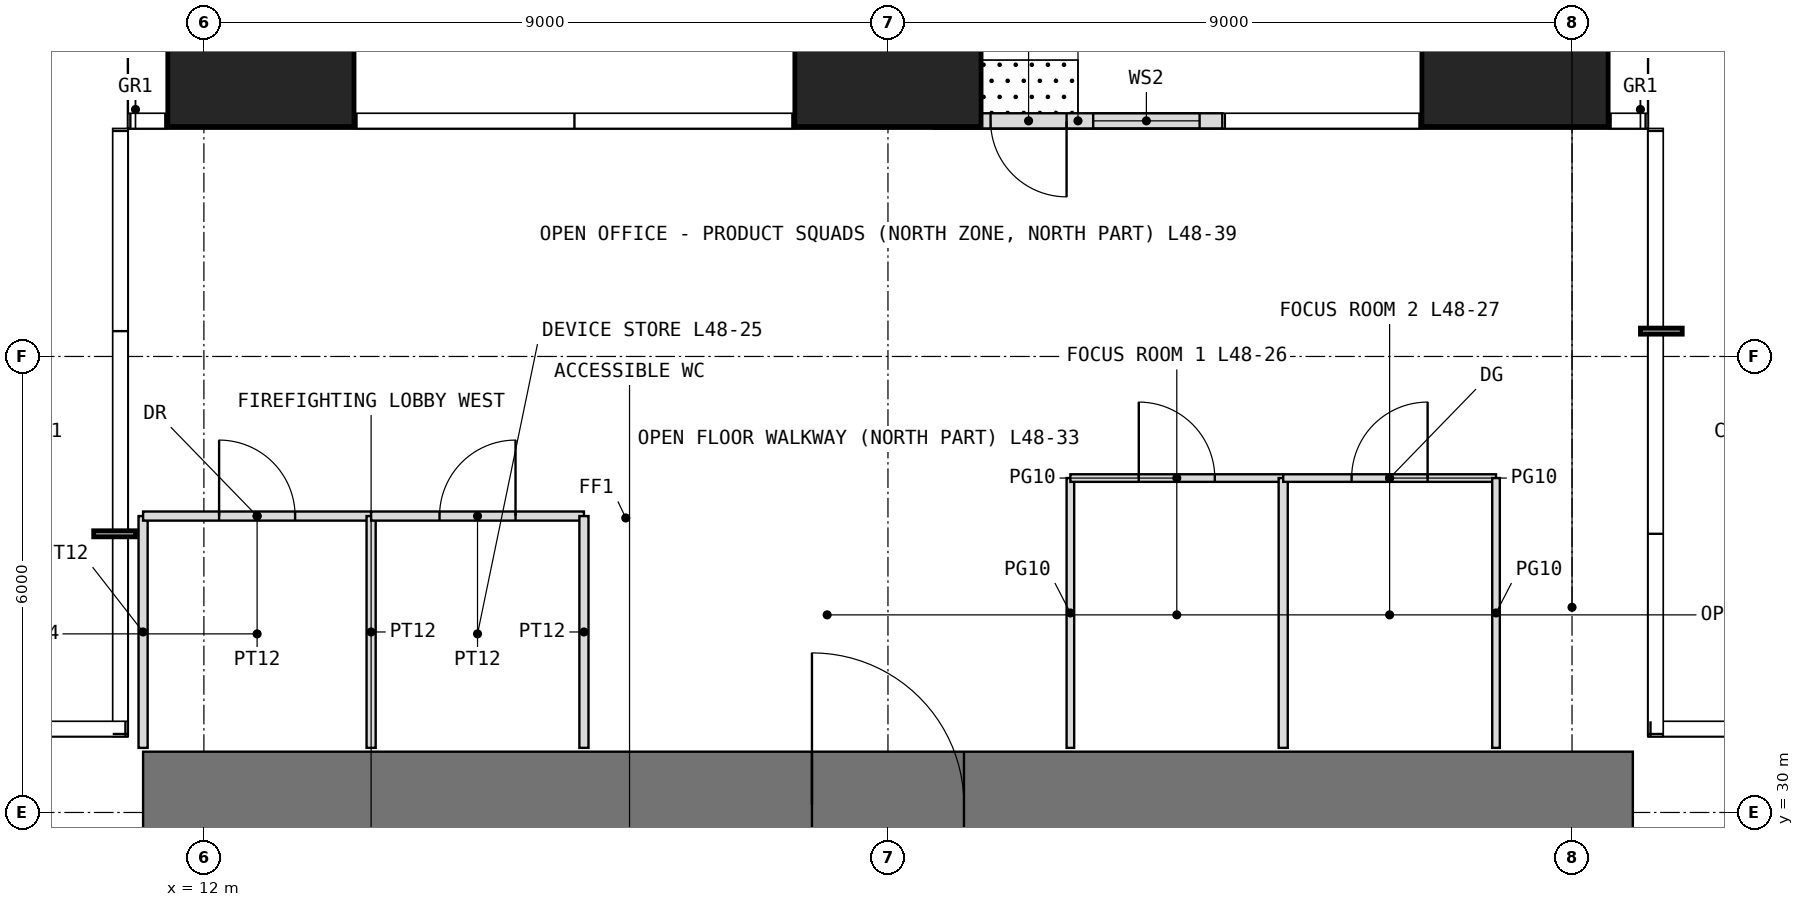
"""IFC4 building model, lengths in metres.
Left out: names, types, materials, properties, quantities, classifications, styles, units other than length and angle.
Written with IfcOpenShell. Run it as: python <this file> out.ifc"""

import sys

from ifc_helpers import new_model, si_unit, direction, frame, frame_2d, origin, origin_2d, place, context, subcontext, project, spatial, rectangle, extrude, element, fill, save


model = new_model("IFC4")
c1 = context("Model", 3, precision=1e-05, world=origin(), true_north=direction((0.0, 1.0)))
c2 = subcontext(c1, "Body", "Model", "MODEL_VIEW")
j1 = project(units=[si_unit("LENGTHUNIT", "METRE"), si_unit("PLANEANGLEUNIT", "RADIAN")], contexts=[c1])
p1 = place(None, origin())
s1 = spatial("IfcSite", under=j1, at=p1, CompositionType="ELEMENT")
p2 = place(p1, origin())
s2 = spatial("IfcBuilding", under=s1, at=p2, CompositionType="ELEMENT")
p3 = place(p2, frame((0.0, 0.0, 202.5)))
s3 = spatial("IfcBuildingStorey", under=s2, at=p3, CompositionType="ELEMENT", Elevation=202.5)
for number, where, z_axis, x_axis in (
    (1, (12.75, 40.25, 0.0), (0.0, 0.0, 1.0), (1.0, 0.0, 0.0)),
    (2, (21.0, 40.25, 0.0), (0.0, 0.0, 1.0), (1.0, 0.0, 0.0)),
    (3, (29.25, 40.25, 0.0), (0.0, 0.0, 1.0), (1.0, 0.0, 0.0)),
):
    element("IfcColumn", number, at=place(p3, frame(where, z_axis=z_axis, x_axis=x_axis)), inside=s3, PredefinedType="COLUMN", context=c2, shape_type="SweptSolid", body=[
        extrude(rectangle(XDim=2.45, YDim=2.45, at=origin_2d()), origin(), (0.0, 0.0, 1.0), 4.0),
    ])
p4 = place(p3, frame((25.4, 39.1, 0.0), z_axis=(0.0, 0.0, 1.0), x_axis=(-1.0, 0.0, 0.0)))
e4 = element("IfcWall", 4, at=p4, inside=s3, PredefinedType="USERDEFINED", context=c2, shape_type="SweptSolid", body=[
    extrude(rectangle(XDim=3.8, YDim=0.2, at=frame_2d((1.9, 0.0))), origin(), (0.0, 0.0, 1.0), 3.75),
])
p5 = place(p4, frame((2.05, 0.0, 0.0)))
e5 = element("IfcOpeningElement", 5, at=p5, cuts=e4, PredefinedType="OPENING", context=c2, shape_type="SweptSolid", body=[
    extrude(rectangle(XDim=1.0, YDim=2.4, at=frame_2d((0.5, 1.2))), frame((0.0, 0.11, 0.0), z_axis=(0.0, -1.0, 0.0), x_axis=(1.0, 0.0, 0.0)), (0.0, 0.0, 1.0), 0.22),
])
p6 = place(p4, frame((0.3, 0.0, 0.3)))
e6 = element("IfcOpeningElement", 6, at=p6, cuts=e4, PredefinedType="OPENING", context=c2, shape_type="SweptSolid", body=[
    extrude(rectangle(XDim=1.4, YDim=2.7, at=frame_2d((0.7, 1.35))), frame((0.0, 0.11, 0.0), z_axis=(0.0, -1.0, 0.0), x_axis=(1.0, 0.0, 0.0)), (0.0, 0.0, 1.0), 0.22),
])
p7 = place(p3, frame((11.2, 30.1, -0.05), z_axis=(0.0, 0.0, 1.0), x_axis=(1.0, 0.0, 0.0)))
e7 = element("IfcWall", 7, at=p7, inside=s3, PredefinedType="SHEAR", context=c2, shape_type="SweptSolid", body=[
    extrude(rectangle(XDim=19.6, YDim=1.4, at=frame_2d((9.8, 0.0))), origin(), (0.0, 0.0, 1.0), 4.0),
])
p8 = place(p7, frame((8.8, 0.0, 0.05)))
e8 = element("IfcOpeningElement", 8, at=p8, cuts=e7, PredefinedType="OPENING", context=c2, shape_type="SweptSolid", body=[
    extrude(rectangle(XDim=2.0, YDim=2.2, at=frame_2d((1.0, 1.1))), frame((0.0, 0.71, 0.0), z_axis=(0.0, -1.0, 0.0), x_axis=(1.0, 0.0, 0.0)), (0.0, 0.0, 1.0), 1.42),
])
p9 = place(p3, frame((11.2, 30.85, 0.0), z_axis=(0.0, 0.0, 1.0), x_axis=(0.0, 1.0, 0.0)))
e9 = element("IfcWall", 9, at=p9, inside=s3, PredefinedType="PARTITIONING", context=c2, shape_type="SweptSolid", body=[
    extrude(rectangle(XDim=3.05, YDim=0.12, at=frame_2d((1.525, 0.0))), origin(), (0.0, 0.0, 1.0), 3.75),
])
p10 = place(p3, frame((11.2, 33.9, 0.0), z_axis=(0.0, 0.0, 1.0), x_axis=(1.0, 0.0, 0.0)))
e10 = element("IfcWall", 10, at=p10, inside=s3, PredefinedType="PARTITIONING", context=c2, shape_type="SweptSolid", body=[
    extrude(rectangle(XDim=3.0, YDim=0.12, at=frame_2d((1.5, 0.0))), origin(), (0.0, 0.0, 1.0), 3.75),
])
p11 = place(p10, frame((1.0, 0.0, 0.0)))
e11 = element("IfcOpeningElement", 11, at=p11, cuts=e10, PredefinedType="OPENING", context=c2, shape_type="SweptSolid", body=[
    extrude(rectangle(XDim=1.0, YDim=2.2, at=frame_2d((0.5, 1.1))), frame((0.0, 0.07, 0.0), z_axis=(0.0, -1.0, 0.0), x_axis=(1.0, 0.0, 0.0)), (0.0, 0.0, 1.0), 0.14),
])
p12 = place(p3, frame((14.2, 30.85, 0.0), z_axis=(0.0, 0.0, 1.0), x_axis=(0.0, 1.0, 0.0)))
e12 = element("IfcWall", 12, at=p12, inside=s3, PredefinedType="PARTITIONING", context=c2, shape_type="SweptSolid", body=[
    extrude(rectangle(XDim=3.05, YDim=0.12, at=frame_2d((1.525, 0.0))), origin(), (0.0, 0.0, 1.0), 3.75),
])
p13 = place(p3, frame((14.2, 33.9, 0.0), z_axis=(0.0, 0.0, 1.0), x_axis=(1.0, 0.0, 0.0)))
e13 = element("IfcWall", 13, at=p13, inside=s3, PredefinedType="PARTITIONING", context=c2, shape_type="SweptSolid", body=[
    extrude(rectangle(XDim=2.8, YDim=0.12, at=frame_2d((1.4, 0.0))), origin(), (0.0, 0.0, 1.0), 3.75),
])
p14 = place(p13, frame((0.9, 0.0, 0.0)))
e14 = element("IfcOpeningElement", 14, at=p14, cuts=e13, PredefinedType="OPENING", context=c2, shape_type="SweptSolid", body=[
    extrude(rectangle(XDim=1.0, YDim=2.2, at=frame_2d((0.5, 1.1))), frame((0.0, 0.07, 0.0), z_axis=(0.0, -1.0, 0.0), x_axis=(1.0, 0.0, 0.0)), (0.0, 0.0, 1.0), 0.14),
])
p15 = place(p3, frame((17.0, 30.85, 0.0), z_axis=(0.0, 0.0, 1.0), x_axis=(0.0, 1.0, 0.0)))
e15 = element("IfcWall", 15, at=p15, inside=s3, PredefinedType="PARTITIONING", context=c2, shape_type="SweptSolid", body=[
    extrude(rectangle(XDim=3.05, YDim=0.12, at=frame_2d((1.525, 0.0))), origin(), (0.0, 0.0, 1.0), 3.75),
])
p16 = place(p3, frame((23.4, 30.85, 0.0), z_axis=(0.0, 0.0, 1.0), x_axis=(0.0, 1.0, 0.0)))
e16 = element("IfcWall", 16, at=p16, inside=s3, PredefinedType="PARTITIONING", context=c2, shape_type="SweptSolid", body=[
    extrude(rectangle(XDim=3.55, YDim=0.1, at=frame_2d((1.775, 0.0))), origin(), (0.0, 0.0, 1.0), 3.75),
])
p17 = place(p3, frame((23.4, 34.4, 0.0), z_axis=(0.0, 0.0, 1.0), x_axis=(1.0, 0.0, 0.0)))
e17 = element("IfcWall", 17, at=p17, inside=s3, PredefinedType="PARTITIONING", context=c2, shape_type="SweptSolid", body=[
    extrude(rectangle(XDim=2.8, YDim=0.1, at=frame_2d((1.4, 0.0))), origin(), (0.0, 0.0, 1.0), 3.75),
])
p18 = place(p17, frame((0.9, 0.0, 0.0)))
e18 = element("IfcOpeningElement", 18, at=p18, cuts=e17, PredefinedType="OPENING", context=c2, shape_type="SweptSolid", body=[
    extrude(rectangle(XDim=1.0, YDim=2.4, at=frame_2d((0.5, 1.2))), frame((0.0, 0.06, 0.0), z_axis=(0.0, -1.0, 0.0), x_axis=(1.0, 0.0, 0.0)), (0.0, 0.0, 1.0), 0.12),
])
p19 = place(p3, frame((26.2, 30.85, 0.0), z_axis=(0.0, 0.0, 1.0), x_axis=(0.0, 1.0, 0.0)))
e19 = element("IfcWall", 19, at=p19, inside=s3, PredefinedType="PARTITIONING", context=c2, shape_type="SweptSolid", body=[
    extrude(rectangle(XDim=3.55, YDim=0.12, at=frame_2d((1.775, 0.0))), origin(), (0.0, 0.0, 1.0), 3.75),
])
p20 = place(p3, frame((26.2, 34.4, 0.0), z_axis=(0.0, 0.0, 1.0), x_axis=(1.0, 0.0, 0.0)))
e20 = element("IfcWall", 20, at=p20, inside=s3, PredefinedType="PARTITIONING", context=c2, shape_type="SweptSolid", body=[
    extrude(rectangle(XDim=2.8, YDim=0.1, at=frame_2d((1.4, 0.0))), origin(), (0.0, 0.0, 1.0), 3.75),
])
p21 = place(p20, frame((0.9, 0.0, 0.0)))
e21 = element("IfcOpeningElement", 21, at=p21, cuts=e20, PredefinedType="OPENING", context=c2, shape_type="SweptSolid", body=[
    extrude(rectangle(XDim=1.0, YDim=2.4, at=frame_2d((0.5, 1.2))), frame((0.0, 0.06, 0.0), z_axis=(0.0, -1.0, 0.0), x_axis=(1.0, 0.0, 0.0)), (0.0, 0.0, 1.0), 0.12),
])
p22 = place(p3, frame((29.0, 30.85, 0.0), z_axis=(0.0, 0.0, 1.0), x_axis=(0.0, 1.0, 0.0)))
e22 = element("IfcWall", 22, at=p22, inside=s3, PredefinedType="PARTITIONING", context=c2, shape_type="SweptSolid", body=[
    extrude(rectangle(XDim=3.55, YDim=0.1, at=frame_2d((1.775, 0.0))), origin(), (0.0, 0.0, 1.0), 3.75),
])
p23 = place(p5, origin())
e23 = element("IfcDoor", 23, at=p23, inside=s3, OperationType="SINGLE_SWING_LEFT", PredefinedType="DOOR", context=c2, shape_type="SweptSolid", body=[
    extrude(rectangle(XDim=1.0, YDim=2.4, at=frame_2d((0.5, 1.2))), frame((0.0, 0.025, 0.0), z_axis=(0.0, -1.0, 0.0), x_axis=(1.0, 0.0, 0.0)), (0.0, 0.0, 1.0), 0.05),
])
fill(e5, e23)
p24 = place(p6, origin())
e24 = element("IfcWindow", 24, at=p24, inside=s3, PartitioningType="SINGLE_PANEL", PredefinedType="WINDOW", context=c2, shape_type="SweptSolid", body=[
    extrude(rectangle(XDim=1.4, YDim=2.7, at=frame_2d((0.7, 1.35))), frame((0.0, 0.03, 0.0), z_axis=(0.0, -1.0, 0.0), x_axis=(1.0, 0.0, 0.0)), (0.0, 0.0, 1.0), 0.06),
])
fill(e6, e24)
p25 = place(p8, origin())
e25 = element("IfcDoor", 25, at=p25, inside=s3, OperationType="DOUBLE_DOOR_SINGLE_SWING", PredefinedType="DOOR", context=c2, shape_type="SweptSolid", body=[
    extrude(rectangle(XDim=2.0, YDim=2.2, at=frame_2d((1.0, 1.1))), frame((0.0, 0.025, 0.0), z_axis=(0.0, -1.0, 0.0), x_axis=(1.0, 0.0, 0.0)), (0.0, 0.0, 1.0), 0.05),
])
fill(e8, e25)
p26 = place(p11, origin())
e26 = element("IfcDoor", 26, at=p26, inside=s3, OperationType="SINGLE_SWING_LEFT", PredefinedType="DOOR", context=c2, shape_type="SweptSolid", body=[
    extrude(rectangle(XDim=1.0, YDim=2.2, at=frame_2d((0.5, 1.1))), frame((0.0, 0.025, 0.0), z_axis=(0.0, -1.0, 0.0), x_axis=(1.0, 0.0, 0.0)), (0.0, 0.0, 1.0), 0.05),
])
fill(e11, e26)
p27 = place(p14, origin())
e27 = element("IfcDoor", 27, at=p27, inside=s3, OperationType="SINGLE_SWING_RIGHT", PredefinedType="DOOR", context=c2, shape_type="SweptSolid", body=[
    extrude(rectangle(XDim=1.0, YDim=2.2, at=frame_2d((0.5, 1.1))), frame((0.0, 0.025, 0.0), z_axis=(0.0, -1.0, 0.0), x_axis=(1.0, 0.0, 0.0)), (0.0, 0.0, 1.0), 0.05),
])
fill(e14, e27)
p28 = place(p18, origin())
e28 = element("IfcDoor", 28, at=p28, inside=s3, OperationType="SINGLE_SWING_LEFT", PredefinedType="DOOR", context=c2, shape_type="SweptSolid", body=[
    extrude(rectangle(XDim=1.0, YDim=2.4, at=frame_2d((0.5, 1.2))), frame((0.0, 0.025, 0.0), z_axis=(0.0, -1.0, 0.0), x_axis=(1.0, 0.0, 0.0)), (0.0, 0.0, 1.0), 0.05),
])
fill(e18, e28)
p29 = place(p21, origin())
e29 = element("IfcDoor", 29, at=p29, inside=s3, OperationType="SINGLE_SWING_RIGHT", PredefinedType="DOOR", context=c2, shape_type="SweptSolid", body=[
    extrude(rectangle(XDim=1.0, YDim=2.4, at=frame_2d((0.5, 1.2))), frame((0.0, 0.025, 0.0), z_axis=(0.0, -1.0, 0.0), x_axis=(1.0, 0.0, 0.0)), (0.0, 0.0, 1.0), 0.05),
])
fill(e21, e29)
save(model, sys.argv[1])
